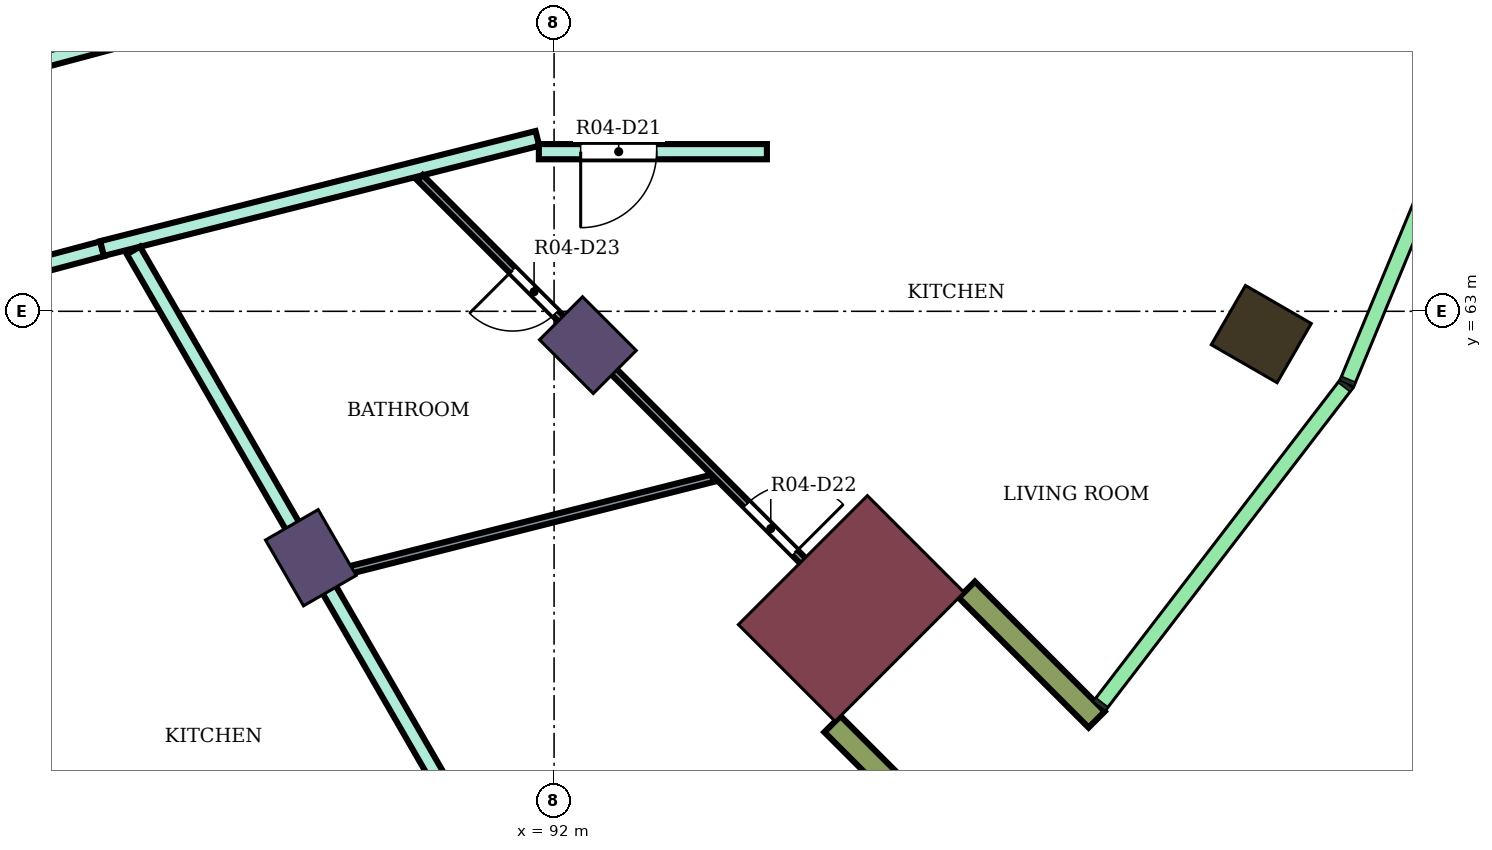
"""IFC4 building model, lengths in metres.
Left out: names, types, materials, properties, quantities, classifications, styles, units other than length and angle.
Written with IfcOpenShell. Run it as: python <this file> out.ifc"""

import sys

from ifc_helpers import new_model, si_unit, direction, frame, frame_2d, origin, origin_2d, place, context, subcontext, project, spatial, rectangle, extrude, element, fill, save


model = new_model("IFC4")
c1 = context("Model", 3, precision=1e-05, world=origin(), true_north=direction((0.0, 1.0)))
c2 = subcontext(c1, "Body", "Model", "MODEL_VIEW")
j1 = project(units=[si_unit("LENGTHUNIT", "METRE"), si_unit("PLANEANGLEUNIT", "RADIAN")], contexts=[c1])
p1 = place(None, origin())
s1 = spatial("IfcSite", under=j1, at=p1, CompositionType="ELEMENT")
p2 = place(p1, origin())
s2 = spatial("IfcBuilding", under=s1, at=p2, CompositionType="ELEMENT")
p3 = place(p2, frame((0.0, 0.0, 194.6)))
s3 = spatial("IfcBuildingStorey", under=s2, at=p3, CompositionType="ELEMENT", Elevation=194.6)
p4 = place(p3, frame((101.304, 62.7, 0.0), z_axis=(0.0, 0.0, 1.0), x_axis=(0.866025403784, -0.5, 0.0)))
e1 = element("IfcColumn", 1, at=p4, inside=s3, PredefinedType="COLUMN", context=c2, shape_type="SweptSolid", body=[
    extrude(rectangle(XDim=1.0, YDim=0.9, at=origin_2d()), origin(), (0.0, 0.0, 1.0), 4.1),
])
for number, where, z_axis, x_axis in (
    (2, (88.8, 59.758, 0.0), (0.0, 0.0, 1.0), (0.5, -0.866, 0.0)),
    (3, (92.445, 62.555, 0.0), (0.0, 0.0, 1.0), (0.707, -0.707, 0.0)),
):
    element("IfcColumn", number, at=place(p3, frame(where, z_axis=z_axis, x_axis=x_axis)), inside=s3, PredefinedType="COLUMN", context=c2, shape_type="SweptSolid", body=[
        extrude(rectangle(XDim=1.0, YDim=0.8, at=origin_2d()), origin(), (0.0, 0.0, 1.0), 4.1),
    ])
p5 = place(p3, frame((95.91, 59.09, 0.0), z_axis=(0.0, 0.0, 1.0), x_axis=(0.707106781187, -0.707106781187, 0.0)))
e4 = element("IfcColumn", 4, at=p5, inside=s3, PredefinedType="COLUMN", context=c2, shape_type="SweptSolid", body=[
    extrude(rectangle(XDim=1.8, YDim=2.4, at=origin_2d()), origin(), (0.0, 0.0, 1.0), 4.1),
])
for number, where, z_axis, x_axis in (
    (5, (95.662, 57.57, 0.0), (0.0, 0.0, 1.0), (0.707, -0.707, 0.0)),
    (6, (97.43, 59.338, 0.0), (0.0, 0.0, 1.0), (0.707, -0.707, 0.0)),
):
    element("IfcWall", number, at=place(p3, frame(where, z_axis=z_axis, x_axis=x_axis)), inside=s3, PredefinedType="NOTDEFINED", context=c2, shape_type="SweptSolid", body=[
        extrude(rectangle(XDim=2.416, YDim=0.3, at=frame_2d((1.208, 0.0))), origin(), (0.0, 0.0, 1.0), 4.1),
    ])
p6 = place(p3, frame((80.048, 62.217, 0.0), z_axis=(0.0, 0.0, 1.0), x_axis=(0.966097920642, 0.258175923996, 0.0)))
e7 = element("IfcWall", 7, at=p6, inside=s3, PredefinedType="PARTITIONING", context=c2, shape_type="SweptSolid", body=[
    extrude(rectangle(XDim=6.217, YDim=0.2, at=frame_2d((3.108, 0.0))), origin(), (0.0, 0.0, 1.0), 3.65),
])
p7 = place(p6, frame((3.792, 0.0, 0.0)))
e8 = element("IfcOpeningElement", 8, at=p7, cuts=e7, PredefinedType="OPENING", context=c2, shape_type="SweptSolid", body=[
    extrude(rectangle(XDim=1.0, YDim=2.1, at=frame_2d((0.5, 1.05))), frame((0.0, 0.11, 0.0), z_axis=(0.0, -1.0, 0.0), x_axis=(1.0, 0.0, 0.0)), (0.0, 0.0, 1.0), 0.22),
])
p8 = place(p3, frame((80.0, 64.898, 0.0), z_axis=(0.0, 0.0, 1.0), x_axis=(0.966236923997, 0.25765520896, 0.0)))
e9 = element("IfcWall", 9, at=p8, inside=s3, PredefinedType="PARTITIONING", context=c2, shape_type="SweptSolid", body=[
    extrude(rectangle(XDim=8.168, YDim=0.2, at=frame_2d((4.084, 0.0))), origin(), (0.0, 0.0, 1.0), 3.65),
])
p9 = place(p8, frame((1.893, 0.0, 0.0)))
e10 = element("IfcOpeningElement", 10, at=p9, cuts=e9, PredefinedType="OPENING", context=c2, shape_type="SweptSolid", body=[
    extrude(rectangle(XDim=1.8, YDim=2.1, at=frame_2d((0.9, 1.05))), frame((0.0, 0.11, 0.0), z_axis=(0.0, -1.0, 0.0), x_axis=(1.0, 0.0, 0.0)), (0.0, 0.0, 1.0), 0.22),
])
p10 = place(p3, frame((86.053, 63.826, 0.0), z_axis=(0.0, 0.0, 1.0), x_axis=(0.969490004987, 0.245130843083, 0.0)))
e11 = element("IfcWall", 11, at=p10, inside=s3, PredefinedType="PARTITIONING", context=c2, shape_type="SweptSolid", body=[
    extrude(rectangle(XDim=5.908, YDim=0.2, at=frame_2d((2.954, 0.0))), origin(), (0.0, 0.0, 1.0), 3.65),
])
p11 = place(p3, frame((86.466, 63.801, 0.0), z_axis=(0.0, 0.0, 1.0), x_axis=(0.499937082171, -0.866061726362, 0.0)))
e12 = element("IfcWall", 12, at=p11, inside=s3, PredefinedType="PARTITIONING", context=c2, shape_type="SweptSolid", body=[
    extrude(rectangle(XDim=12.866, YDim=0.2, at=frame_2d((6.433, 0.0))), origin(), (0.0, 0.0, 1.0), 3.65),
])
p12 = place(p3, frame((91.8, 65.1, 0.0), z_axis=(0.0, 0.0, 1.0), x_axis=(1.0, 0.0, 0.0)))
e13 = element("IfcWall", 13, at=p12, inside=s3, PredefinedType="PARTITIONING", context=c2, shape_type="SweptSolid", body=[
    extrude(rectangle(XDim=3.0, YDim=0.2, at=frame_2d((1.5, 0.0))), origin(), (0.0, 0.0, 1.0), 3.65),
])
p13 = place(p12, frame((0.55, 0.0, 0.0)))
e14 = element("IfcOpeningElement", 14, at=p13, cuts=e13, PredefinedType="OPENING", context=c2, shape_type="SweptSolid", body=[
    extrude(rectangle(XDim=1.0, YDim=2.1, at=frame_2d((0.5, 1.05))), frame((0.0, 0.11, 0.0), z_axis=(0.0, -1.0, 0.0), x_axis=(1.0, 0.0, 0.0)), (0.0, 0.0, 1.0), 0.22),
])
p14 = place(p3, frame((83.228, 62.955, 0.0), z_axis=(0.0, 0.0, 1.0), x_axis=(0.258737611245, -0.965947642746, 0.0)))
e15 = element("IfcWall", 15, at=p14, inside=s3, PredefinedType="PARTITIONING", context=c2, shape_type="SweptSolid", body=[
    extrude(rectangle(XDim=13.328, YDim=0.1, at=frame_2d((6.664, 0.0))), origin(), (0.0, 0.0, 1.0), 3.65),
])
p15 = place(p14, frame((9.684, 0.0, 0.0)))
e16 = element("IfcOpeningElement", 16, at=p15, cuts=e15, PredefinedType="OPENING", context=c2, shape_type="SweptSolid", body=[
    extrude(rectangle(XDim=0.9, YDim=2.1, at=frame_2d((0.45, 1.05))), frame((0.0, 0.06, 0.0), z_axis=(0.0, -1.0, 0.0), x_axis=(1.0, 0.0, 0.0)), (0.0, 0.0, 1.0), 0.12),
])
p16 = place(p14, frame((2.65, 0.0, 0.0)))
e17 = element("IfcOpeningElement", 17, at=p16, cuts=e15, PredefinedType="OPENING", context=c2, shape_type="SweptSolid", body=[
    extrude(rectangle(XDim=0.8, YDim=2.1, at=frame_2d((0.4, 1.05))), frame((0.0, 0.06, 0.0), z_axis=(0.0, -1.0, 0.0), x_axis=(1.0, 0.0, 0.0)), (0.0, 0.0, 1.0), 0.12),
])
p17 = place(p3, frame((89.054, 59.531, 0.0), z_axis=(0.0, 0.0, 1.0), x_axis=(0.969472150829, 0.245201445279, 0.0)))
e18 = element("IfcWall", 18, at=p17, inside=s3, PredefinedType="PARTITIONING", context=c2, shape_type="SweptSolid", body=[
    extrude(rectangle(XDim=5.191, YDim=0.1, at=frame_2d((2.596, 0.0))), origin(), (0.0, 0.0, 1.0), 3.65),
])
p18 = place(p3, frame((90.236, 64.758, 0.0), z_axis=(0.0, 0.0, 1.0), x_axis=(0.706952774706, -0.707260754132, 0.0)))
e19 = element("IfcWall", 19, at=p18, inside=s3, PredefinedType="PARTITIONING", context=c2, shape_type="SweptSolid", body=[
    extrude(rectangle(XDim=8.72, YDim=0.1, at=frame_2d((4.36, 0.0))), origin(), (0.0, 0.0, 1.0), 3.65),
])
p19 = place(p18, frame((6.077, 0.0, 0.0)))
e20 = element("IfcOpeningElement", 20, at=p19, cuts=e19, PredefinedType="OPENING", context=c2, shape_type="SweptSolid", body=[
    extrude(rectangle(XDim=0.9, YDim=2.1, at=frame_2d((0.45, 1.05))), frame((0.0, 0.06, 0.0), z_axis=(0.0, -1.0, 0.0), x_axis=(1.0, 0.0, 0.0)), (0.0, 0.0, 1.0), 0.12),
])
p20 = place(p18, frame((1.722, 0.0, 0.0)))
e21 = element("IfcOpeningElement", 21, at=p20, cuts=e19, PredefinedType="OPENING", context=c2, shape_type="SweptSolid", body=[
    extrude(rectangle(XDim=0.8, YDim=2.1, at=frame_2d((0.4, 1.05))), frame((0.0, 0.06, 0.0), z_axis=(0.0, -1.0, 0.0), x_axis=(1.0, 0.0, 0.0)), (0.0, 0.0, 1.0), 0.12),
])
p21 = place(p13, frame((1.0, 0.0, 0.0), z_axis=(0.0, 0.0, 1.0), x_axis=(-1.0, 0.0, 0.0)))
e22 = element("IfcDoor", 22, at=p21, inside=s3, OperationType="SINGLE_SWING_RIGHT", PredefinedType="DOOR", context=c2, shape_type="SweptSolid", body=[
    extrude(rectangle(XDim=1.0, YDim=2.1, at=frame_2d((0.5, 1.05))), frame((0.0, 0.025, 0.0), z_axis=(0.0, -1.0, 0.0), x_axis=(1.0, 0.0, 0.0)), (0.0, 0.0, 1.0), 0.05),
])
fill(e14, e22)
p22 = place(p19, origin())
e23 = element("IfcDoor", 23, at=p22, inside=s3, OperationType="SINGLE_SWING_RIGHT", PredefinedType="DOOR", context=c2, shape_type="SweptSolid", body=[
    extrude(rectangle(XDim=0.9, YDim=2.1, at=frame_2d((0.45, 1.05))), frame((0.0, 0.025, 0.0), z_axis=(0.0, -1.0, 0.0), x_axis=(1.0, 0.0, 0.0)), (0.0, 0.0, 1.0), 0.05),
])
fill(e20, e23)
p23 = place(p20, frame((0.8, 0.0, 0.0), z_axis=(0.0, 0.0, 1.0), x_axis=(-1.0, 0.0, 0.0)))
e24 = element("IfcDoor", 24, at=p23, inside=s3, OperationType="SINGLE_SWING_RIGHT", PredefinedType="DOOR", context=c2, shape_type="SweptSolid", body=[
    extrude(rectangle(XDim=0.8, YDim=2.1, at=frame_2d((0.4, 1.05))), frame((0.0, 0.025, 0.0), z_axis=(0.0, -1.0, 0.0), x_axis=(1.0, 0.0, 0.0)), (0.0, 0.0, 1.0), 0.05),
])
fill(e21, e24)
save(model, sys.argv[1])
